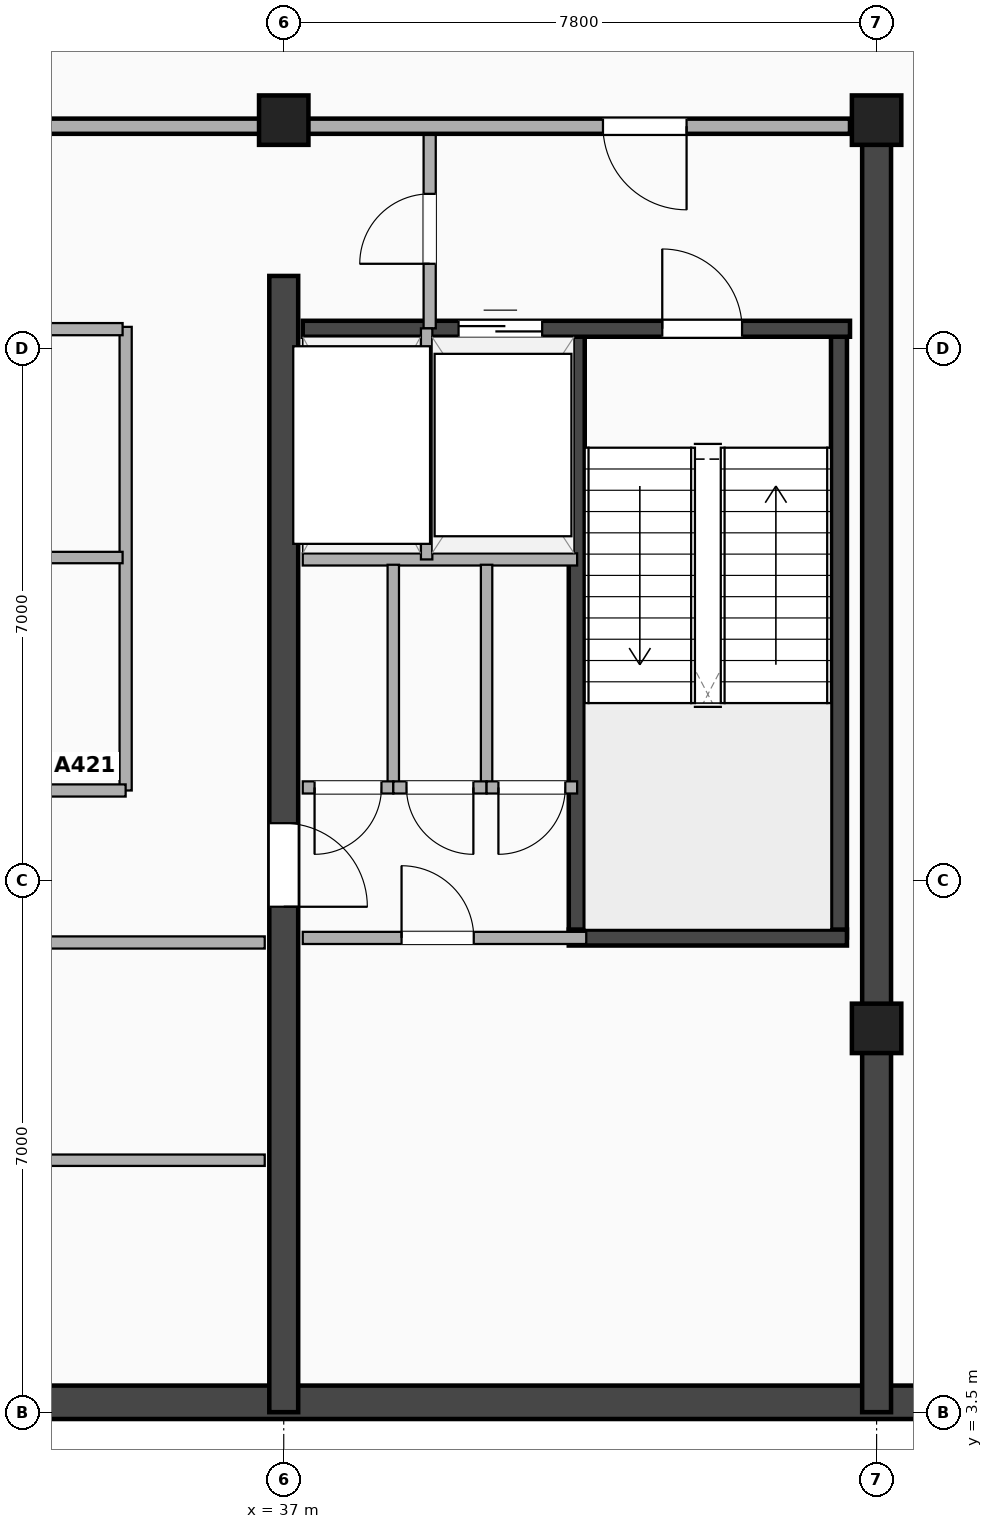
"""IFC4 building model, lengths in metres.
Left out: names, types, materials, properties, quantities, classifications, styles, units other than length and angle.
Written with IfcOpenShell. Run it as: python <this file> out.ifc"""

import sys

from ifc_helpers import new_model, si_unit, direction, frame, frame_2d, origin, origin_2d, place, context, subcontext, project, spatial, rectangle, extrude, element, fill, save


model = new_model("IFC4")
c1 = context("Model", 3, precision=1e-05, world=origin(), true_north=direction((0.0, 1.0)))
c2 = subcontext(c1, "Body", "Model", "MODEL_VIEW")
j1 = project(units=[si_unit("LENGTHUNIT", "METRE"), si_unit("PLANEANGLEUNIT", "RADIAN")], contexts=[c1])
p1 = place(None, origin())
s1 = spatial("IfcSite", under=j1, at=p1, CompositionType="ELEMENT")
p2 = place(p1, origin())
s2 = spatial("IfcBuilding", under=s1, at=p2, CompositionType="ELEMENT")
p3 = place(p2, frame((0.0, 0.0, 298.7)))
s3 = spatial("IfcBuildingStorey", under=s2, at=p3, CompositionType="ELEMENT", Elevation=298.7)
p4 = place(p3, frame((16.5, 3.63, 0.0), z_axis=(0.0, 0.0, 1.0), x_axis=(1.0, 0.0, 0.0)))
e1 = element("IfcWall", 1, at=p4, inside=s3, PredefinedType="SHEAR", context=c2, shape_type="SweptSolid", body=[
    extrude(rectangle(XDim=29.6, YDim=0.44, at=frame_2d((14.8, 0.0))), origin(), (0.0, 0.0, 1.0), 4.3),
])
p5 = place(p3, frame((44.8, 3.5, 0.0), z_axis=(0.0, 0.0, 1.0), x_axis=(0.0, 1.0, 0.0)))
e2 = element("IfcWall", 2, at=p5, inside=s3, PredefinedType="SHEAR", context=c2, shape_type="SweptSolid", body=[
    extrude(rectangle(XDim=16.9, YDim=0.38, at=frame_2d((8.45, 0.0))), origin(), (0.0, 0.0, 1.0), 4.3),
])
p6 = place(p3, frame((37.0, 3.5, 0.0), z_axis=(0.0, 0.0, 1.0), x_axis=(0.0, 1.0, 0.0)))
e3 = element("IfcWall", 3, at=p6, inside=s3, PredefinedType="SHEAR", context=c2, shape_type="SweptSolid", body=[
    extrude(rectangle(XDim=14.95, YDim=0.38, at=frame_2d((7.475, 0.0))), origin(), (0.0, 0.0, 1.0), 4.3),
])
p7 = place(p6, frame((6.65, 0.0, 0.0)))
e4 = element("IfcOpeningElement", 4, at=p7, cuts=e3, PredefinedType="OPENING", context=c2, shape_type="SweptSolid", body=[
    extrude(rectangle(XDim=1.1, YDim=2.15, at=frame_2d((0.55, 1.075))), frame((0.0, 0.2, 0.0), z_axis=(0.0, -1.0, 0.0), x_axis=(1.0, 0.0, 0.0)), (0.0, 0.0, 1.0), 0.4),
])
for number, where, z_axis, x_axis in (
    (5, (40.855, 9.745, 0.0), (0.0, 0.0, 1.0), (0.0, 1.0, 0.0)),
    (6, (44.305, 9.745, 0.0), (0.0, 0.0, 1.0), (0.0, 1.0, 0.0)),
):
    element("IfcWall", number, at=place(p3, frame(where, z_axis=z_axis, x_axis=x_axis)), inside=s3, PredefinedType="SHEAR", context=c2, shape_type="SweptSolid", body=[
        extrude(rectangle(XDim=8.01, YDim=0.21, at=frame_2d((4.005, 0.0))), origin(), (0.0, 0.0, 1.0), 4.3),
    ])
p8 = place(p3, frame((40.75, 9.745, 0.0), z_axis=(0.0, 0.0, 1.0), x_axis=(1.0, 0.0, 0.0)))
e7 = element("IfcWall", 7, at=p8, inside=s3, PredefinedType="SHEAR", context=c2, shape_type="SweptSolid", body=[
    extrude(rectangle(XDim=3.66, YDim=0.21, at=frame_2d((1.83, 0.0))), origin(), (0.0, 0.0, 1.0), 4.3),
])
p9 = place(p3, frame((37.25, 17.755, 0.0), z_axis=(0.0, 0.0, 1.0), x_axis=(1.0, 0.0, 0.0)))
e8 = element("IfcWall", 8, at=p9, inside=s3, PredefinedType="SHEAR", context=c2, shape_type="SweptSolid", body=[
    extrude(rectangle(XDim=7.2, YDim=0.21, at=frame_2d((3.6, 0.0))), origin(), (0.0, 0.0, 1.0), 4.3),
])
p10 = place(p9, frame((2.05, 0.0, 0.0)))
e9 = element("IfcOpeningElement", 9, at=p10, cuts=e8, PredefinedType="OPENING", context=c2, shape_type="SweptSolid", body=[
    extrude(rectangle(XDim=1.1, YDim=2.18, at=frame_2d((0.55, 1.09))), frame((0.0, 0.115, 0.0), z_axis=(0.0, -1.0, 0.0), x_axis=(1.0, 0.0, 0.0)), (0.0, 0.0, 1.0), 0.23),
])
p11 = place(p9, frame((5.78, 0.0, 0.0), z_axis=(0.0, 0.0, 1.0), x_axis=(-1.0, 0.0, 0.0)))
e10 = element("IfcOpeningElement", 10, at=p11, cuts=e8, PredefinedType="OPENING", context=c2, shape_type="SweptSolid", body=[
    extrude(rectangle(XDim=1.05, YDim=2.15, at=frame_2d((0.525, 1.075))), frame((0.0, 0.115, 0.0), z_axis=(0.0, -1.0, 0.0), x_axis=(1.0, 0.0, 0.0)), (0.0, 0.0, 1.0), 0.23),
])
for number, where, z_axis, x_axis in (
    (11, (44.8, 8.55, -0.3), (0.0, 0.0, 1.0), (1.0, 0.0, 0.0)),
    (12, (37.0, 20.5, -0.3), (0.0, 0.0, 1.0), (1.0, 0.0, 0.0)),
    (13, (44.8, 20.5, -0.3), (0.0, 0.0, 1.0), (1.0, 0.0, 0.0)),
):
    element("IfcColumn", number, at=place(p3, frame(where, z_axis=z_axis, x_axis=x_axis)), inside=s3, PredefinedType="COLUMN", context=c2, shape_type="SweptSolid", body=[
        extrude(rectangle(XDim=0.65, YDim=0.65, at=origin_2d()), origin(), (0.0, 0.0, 1.0), 4.6),
    ])
p12 = place(p3, frame((38.92, 17.76, 0.0), z_axis=(0.0, 0.0, 1.0), x_axis=(0.0, 1.0, 0.0)))
e14 = element("IfcWall", 14, at=p12, inside=s3, PredefinedType="PARTITIONING", context=c2, shape_type="SweptSolid", body=[
    extrude(rectangle(XDim=2.66, YDim=0.16, at=frame_2d((1.33, 0.0))), origin(), (0.0, 0.0, 1.0), 3.885),
])
p13 = place(p12, frame((1.77, 0.0, 0.0), z_axis=(0.0, 0.0, 1.0), x_axis=(-1.0, 0.0, 0.0)))
e15 = element("IfcOpeningElement", 15, at=p13, cuts=e14, PredefinedType="OPENING", context=c2, shape_type="SweptSolid", body=[
    extrude(rectangle(XDim=0.92, YDim=2.08, at=frame_2d((0.46, 1.04))), frame((0.0, 0.09, 0.0), z_axis=(0.0, -1.0, 0.0), x_axis=(1.0, 0.0, 0.0)), (0.0, 0.0, 1.0), 0.18),
])
p14 = place(p3, frame((37.25, 14.72, 0.0), z_axis=(0.0, 0.0, 1.0), x_axis=(1.0, 0.0, 0.0)))
e16 = element("IfcWall", 16, at=p14, inside=s3, PredefinedType="PARTITIONING", context=c2, shape_type="SweptSolid", body=[
    extrude(rectangle(XDim=3.61, YDim=0.16, at=frame_2d((1.805, 0.0))), origin(), (0.0, 0.0, 1.0), 4.3),
])
p15 = place(p3, frame((38.88, 14.72, 0.0), z_axis=(0.0, 0.0, 1.0), x_axis=(0.0, 1.0, 0.0)))
e17 = element("IfcWall", 17, at=p15, inside=s3, PredefinedType="PARTITIONING", context=c2, shape_type="SweptSolid", body=[
    extrude(rectangle(XDim=3.04, YDim=0.15, at=frame_2d((1.52, 0.0))), origin(), (0.0, 0.0, 1.0), 4.3),
])
p16 = place(p3, frame((29.2, 20.42, 0.0), z_axis=(0.0, 0.0, 1.0), x_axis=(1.0, 0.0, 0.0)))
e18 = element("IfcWall", 18, at=p16, inside=s3, PredefinedType="PARTITIONING", context=c2, shape_type="SweptSolid", body=[
    extrude(rectangle(XDim=7.8, YDim=0.2, at=frame_2d((3.9, 0.0))), origin(), (0.0, 0.0, 1.0), 2.605),
])
p17 = place(p16, frame((3.409, 0.0, 0.0)))
e19 = element("IfcOpeningElement", 19, at=p17, cuts=e18, PredefinedType="OPENING", context=c2, shape_type="SweptSolid", body=[
    extrude(rectangle(XDim=1.1, YDim=2.15, at=frame_2d((0.55, 1.075))), frame((0.0, 0.11, 0.0), z_axis=(0.0, -1.0, 0.0), x_axis=(1.0, 0.0, 0.0)), (0.0, 0.0, 1.0), 0.22),
])
p18 = place(p3, frame((37.0, 20.42, 0.0), z_axis=(0.0, 0.0, 1.0), x_axis=(1.0, 0.0, 0.0)))
e20 = element("IfcWall", 20, at=p18, inside=s3, PredefinedType="PARTITIONING", context=c2, shape_type="SweptSolid", body=[
    extrude(rectangle(XDim=7.45, YDim=0.2, at=frame_2d((3.725, 0.0))), origin(), (0.0, 0.0, 1.0), 2.605),
])
p19 = place(p18, frame((4.2, 0.0, 0.0)))
e21 = element("IfcOpeningElement", 21, at=p19, cuts=e20, PredefinedType="OPENING", context=c2, shape_type="SweptSolid", body=[
    extrude(rectangle(XDim=1.1, YDim=2.15, at=frame_2d((0.55, 1.075))), frame((0.0, 0.11, 0.0), z_axis=(0.0, -1.0, 0.0), x_axis=(1.0, 0.0, 0.0)), (0.0, 0.0, 1.0), 0.22),
])
p20 = place(p3, frame((38.441, 11.72, 0.0), z_axis=(0.0, 0.0, 1.0), x_axis=(0.0, 1.0, 0.0)))
e22 = element("IfcWall", 22, at=p20, inside=s3, PredefinedType="PARTITIONING", context=c2, shape_type="SweptSolid", body=[
    extrude(rectangle(XDim=2.93, YDim=0.15, at=frame_2d((1.465, 0.0))), origin(), (0.0, 0.0, 1.0), 4.3),
])
p21 = place(p3, frame((37.25, 11.72, 0.0), z_axis=(0.0, 0.0, 1.0), x_axis=(1.0, 0.0, 0.0)))
e23 = element("IfcWall", 23, at=p21, inside=s3, PredefinedType="PARTITIONING", context=c2, shape_type="SweptSolid", body=[
    extrude(rectangle(XDim=1.191, YDim=0.16, at=frame_2d((0.596, 0.0))), origin(), (0.0, 0.0, 1.0), 4.3),
])
p22 = place(p21, frame((0.156, 0.0, 0.0)))
e24 = element("IfcOpeningElement", 24, at=p22, cuts=e23, PredefinedType="OPENING", context=c2, shape_type="SweptSolid", body=[
    extrude(rectangle(XDim=0.88, YDim=2.08, at=frame_2d((0.44, 1.04))), frame((0.0, 0.09, 0.0), z_axis=(0.0, -1.0, 0.0), x_axis=(1.0, 0.0, 0.0)), (0.0, 0.0, 1.0), 0.18),
])
p23 = place(p3, frame((39.669, 11.72, 0.0), z_axis=(0.0, 0.0, 1.0), x_axis=(0.0, 1.0, 0.0)))
e25 = element("IfcWall", 25, at=p23, inside=s3, PredefinedType="PARTITIONING", context=c2, shape_type="SweptSolid", body=[
    extrude(rectangle(XDim=2.93, YDim=0.15, at=frame_2d((1.465, 0.0))), origin(), (0.0, 0.0, 1.0), 4.3),
])
p24 = place(p3, frame((38.441, 11.72, 0.0), z_axis=(0.0, 0.0, 1.0), x_axis=(1.0, 0.0, 0.0)))
e26 = element("IfcWall", 26, at=p24, inside=s3, PredefinedType="PARTITIONING", context=c2, shape_type="SweptSolid", body=[
    extrude(rectangle(XDim=1.227, YDim=0.16, at=frame_2d((0.614, 0.0))), origin(), (0.0, 0.0, 1.0), 4.3),
])
p25 = place(p24, frame((0.174, 0.0, 0.0)))
e27 = element("IfcOpeningElement", 27, at=p25, cuts=e26, PredefinedType="OPENING", context=c2, shape_type="SweptSolid", body=[
    extrude(rectangle(XDim=0.88, YDim=2.08, at=frame_2d((0.44, 1.04))), frame((0.0, 0.09, 0.0), z_axis=(0.0, -1.0, 0.0), x_axis=(1.0, 0.0, 0.0)), (0.0, 0.0, 1.0), 0.18),
])
p26 = place(p3, frame((39.669, 11.72, 0.0), z_axis=(0.0, 0.0, 1.0), x_axis=(1.0, 0.0, 0.0)))
e28 = element("IfcWall", 28, at=p26, inside=s3, PredefinedType="PARTITIONING", context=c2, shape_type="SweptSolid", body=[
    extrude(rectangle(XDim=1.191, YDim=0.16, at=frame_2d((0.596, 0.0))), origin(), (0.0, 0.0, 1.0), 4.3),
])
p27 = place(p26, frame((0.156, 0.0, 0.0)))
e29 = element("IfcOpeningElement", 29, at=p27, cuts=e28, PredefinedType="OPENING", context=c2, shape_type="SweptSolid", body=[
    extrude(rectangle(XDim=0.88, YDim=2.08, at=frame_2d((0.44, 1.04))), frame((0.0, 0.09, 0.0), z_axis=(0.0, -1.0, 0.0), x_axis=(1.0, 0.0, 0.0)), (0.0, 0.0, 1.0), 0.18),
])
p28 = place(p3, frame((37.25, 9.74, 0.0), z_axis=(0.0, 0.0, 1.0), x_axis=(1.0, 0.0, 0.0)))
e30 = element("IfcWall", 30, at=p28, inside=s3, PredefinedType="PARTITIONING", context=c2, shape_type="SweptSolid", body=[
    extrude(rectangle(XDim=3.73, YDim=0.16, at=frame_2d((1.865, 0.0))), origin(), (0.0, 0.0, 1.0), 4.3),
])
p29 = place(p28, frame((2.25, 0.0, 0.0), z_axis=(0.0, 0.0, 1.0), x_axis=(-1.0, 0.0, 0.0)))
e31 = element("IfcOpeningElement", 31, at=p29, cuts=e30, PredefinedType="OPENING", context=c2, shape_type="SweptSolid", body=[
    extrude(rectangle(XDim=0.95, YDim=2.15, at=frame_2d((0.475, 1.075))), frame((0.0, 0.09, 0.0), z_axis=(0.0, -1.0, 0.0), x_axis=(1.0, 0.0, 0.0)), (0.0, 0.0, 1.0), 0.18),
])
p30 = place(p3, frame((34.92, 11.68, 0.0), z_axis=(0.0, 0.0, 1.0), x_axis=(0.0, 1.0, 0.0)))
e32 = element("IfcWall", 32, at=p30, inside=s3, PredefinedType="PARTITIONING", context=c2, shape_type="SweptSolid", body=[
    extrude(rectangle(XDim=6.1, YDim=0.16, at=frame_2d((3.05, 0.0))), origin(), (0.0, 0.0, 1.0), 4.3),
])
p31 = place(p3, frame((29.45, 9.68, 0.0), z_axis=(0.0, 0.0, 1.0), x_axis=(1.0, 0.0, 0.0)))
e33 = element("IfcWall", 33, at=p31, inside=s3, PredefinedType="PARTITIONING", context=c2, shape_type="SweptSolid", body=[
    extrude(rectangle(XDim=7.3, YDim=0.16, at=frame_2d((3.65, 0.0))), origin(), (0.0, 0.0, 1.0), 4.3),
])
p32 = place(p31, frame((4.11, 0.0, 0.0), z_axis=(0.0, 0.0, 1.0), x_axis=(-1.0, 0.0, 0.0)))
e34 = element("IfcOpeningElement", 34, at=p32, cuts=e33, PredefinedType="OPENING", context=c2, shape_type="SweptSolid", body=[
    extrude(rectangle(XDim=0.92, YDim=2.08, at=frame_2d((0.46, 1.04))), frame((0.0, 0.09, 0.0), z_axis=(0.0, -1.0, 0.0), x_axis=(1.0, 0.0, 0.0)), (0.0, 0.0, 1.0), 0.18),
])
p33 = place(p3, frame((29.45, 6.815, 0.0), z_axis=(0.0, 0.0, 1.0), x_axis=(1.0, 0.0, 0.0)))
e35 = element("IfcWall", 35, at=p33, inside=s3, PredefinedType="PARTITIONING", context=c2, shape_type="SweptSolid", body=[
    extrude(rectangle(XDim=7.3, YDim=0.15, at=frame_2d((3.65, 0.0))), origin(), (0.0, 0.0, 1.0), 4.3),
])
p34 = place(p33, frame((4.09, 0.0, 0.0), z_axis=(0.0, 0.0, 1.0), x_axis=(-1.0, 0.0, 0.0)))
e36 = element("IfcOpeningElement", 36, at=p34, cuts=e35, PredefinedType="OPENING", context=c2, shape_type="SweptSolid", body=[
    extrude(rectangle(XDim=0.88, YDim=2.08, at=frame_2d((0.44, 1.04))), frame((0.0, 0.085, 0.0), z_axis=(0.0, -1.0, 0.0), x_axis=(1.0, 0.0, 0.0)), (0.0, 0.0, 1.0), 0.17),
])
p35 = place(p3, frame((29.2, 11.68, 0.0), z_axis=(0.0, 0.0, 1.0), x_axis=(1.0, 0.0, 0.0)))
e37 = element("IfcWall", 37, at=p35, inside=s3, PredefinedType="PARTITIONING", context=c2, shape_type="SweptSolid", body=[
    extrude(rectangle(XDim=5.72, YDim=0.16, at=frame_2d((2.86, 0.0))), origin(), (0.0, 0.0, 1.0), 4.3),
])
p36 = place(p3, frame((29.45, 17.75, 0.0), z_axis=(0.0, 0.0, 1.0), x_axis=(1.0, 0.0, 0.0)))
e38 = element("IfcWall", 38, at=p36, inside=s3, PredefinedType="PARTITIONING", context=c2, shape_type="SweptSolid", body=[
    extrude(rectangle(XDim=5.43, YDim=0.16, at=frame_2d((2.715, 0.0))), origin(), (0.0, 0.0, 1.0), 4.3),
])
p37 = place(p36, frame((3.175, 0.0, 0.0), z_axis=(0.0, 0.0, 1.0), x_axis=(-1.0, 0.0, 0.0)))
e39 = element("IfcOpeningElement", 39, at=p37, cuts=e38, PredefinedType="OPENING", context=c2, shape_type="SweptSolid", body=[
    extrude(rectangle(XDim=0.92, YDim=2.08, at=frame_2d((0.46, 1.04))), frame((0.0, 0.09, 0.0), z_axis=(0.0, -1.0, 0.0), x_axis=(1.0, 0.0, 0.0)), (0.0, 0.0, 1.0), 0.18),
])
p38 = place(p3, frame((29.45, 14.745, 0.0), z_axis=(0.0, 0.0, 1.0), x_axis=(1.0, 0.0, 0.0)))
e40 = element("IfcWall", 40, at=p38, inside=s3, PredefinedType="PARTITIONING", context=c2, shape_type="SweptSolid", body=[
    extrude(rectangle(XDim=5.43, YDim=0.15, at=frame_2d((2.715, 0.0))), origin(), (0.0, 0.0, 1.0), 4.3),
])
p39 = place(p38, frame((3.155, 0.0, 0.0), z_axis=(0.0, 0.0, 1.0), x_axis=(-1.0, 0.0, 0.0)))
e41 = element("IfcOpeningElement", 41, at=p39, cuts=e40, PredefinedType="OPENING", context=c2, shape_type="SweptSolid", body=[
    extrude(rectangle(XDim=0.88, YDim=2.08, at=frame_2d((0.44, 1.04))), frame((0.0, 0.085, 0.0), z_axis=(0.0, -1.0, 0.0), x_axis=(1.0, 0.0, 0.0)), (0.0, 0.0, 1.0), 0.17),
])
p40 = place(p10, origin())
e42 = element("IfcDoor", 42, at=p40, inside=s3, OperationType="DOUBLE_DOOR_SLIDING", PredefinedType="DOOR", context=c2, shape_type="SweptSolid", body=[
    extrude(rectangle(XDim=1.1, YDim=2.18, at=frame_2d((0.55, 1.09))), frame((0.0, 0.025, 0.0), z_axis=(0.0, -1.0, 0.0), x_axis=(1.0, 0.0, 0.0)), (0.0, 0.0, 1.0), 0.05),
])
fill(e9, e42)
p41 = place(p11, origin())
e43 = element("IfcDoor", 43, at=p41, inside=s3, OperationType="SINGLE_SWING_LEFT", PredefinedType="DOOR", context=c2, shape_type="SweptSolid", body=[
    extrude(rectangle(XDim=1.05, YDim=2.15, at=frame_2d((0.525, 1.075))), frame((0.0, 0.025, 0.0), z_axis=(0.0, -1.0, 0.0), x_axis=(1.0, 0.0, 0.0)), (0.0, 0.0, 1.0), 0.05),
])
fill(e10, e43)
p42 = place(p7, origin())
e44 = element("IfcDoor", 44, at=p42, inside=s3, OperationType="SINGLE_SWING_LEFT", PredefinedType="DOOR", context=c2, shape_type="SweptSolid", body=[
    extrude(rectangle(XDim=1.1, YDim=2.15, at=frame_2d((0.55, 1.075))), frame((0.0, 0.025, 0.0), z_axis=(0.0, -1.0, 0.0), x_axis=(1.0, 0.0, 0.0)), (0.0, 0.0, 1.0), 0.05),
])
fill(e4, e44)
p43 = place(p13, origin())
e45 = element("IfcDoor", 45, at=p43, inside=s3, OperationType="SINGLE_SWING_LEFT", PredefinedType="DOOR", context=c2, shape_type="SweptSolid", body=[
    extrude(rectangle(XDim=0.92, YDim=2.08, at=frame_2d((0.46, 1.04))), frame((0.0, 0.025, 0.0), z_axis=(0.0, -1.0, 0.0), x_axis=(1.0, 0.0, 0.0)), (0.0, 0.0, 1.0), 0.05),
])
fill(e15, e45)
p44 = place(p19, origin())
e46 = element("IfcDoor", 46, at=p44, inside=s3, OperationType="SINGLE_SWING_RIGHT", PredefinedType="DOOR", context=c2, shape_type="SweptSolid", body=[
    extrude(rectangle(XDim=1.1, YDim=2.15, at=frame_2d((0.55, 1.075))), frame((0.0, 0.025, 0.0), z_axis=(0.0, -1.0, 0.0), x_axis=(1.0, 0.0, 0.0)), (0.0, 0.0, 1.0), 0.05),
])
fill(e21, e46)
p45 = place(p22, origin())
e47 = element("IfcDoor", 47, at=p45, inside=s3, OperationType="SINGLE_SWING_LEFT", PredefinedType="DOOR", context=c2, shape_type="SweptSolid", body=[
    extrude(rectangle(XDim=0.88, YDim=2.08, at=frame_2d((0.44, 1.04))), frame((0.0, 0.025, 0.0), z_axis=(0.0, -1.0, 0.0), x_axis=(1.0, 0.0, 0.0)), (0.0, 0.0, 1.0), 0.05),
])
fill(e24, e47)
p46 = place(p25, origin())
e48 = element("IfcDoor", 48, at=p46, inside=s3, OperationType="SINGLE_SWING_RIGHT", PredefinedType="DOOR", context=c2, shape_type="SweptSolid", body=[
    extrude(rectangle(XDim=0.88, YDim=2.08, at=frame_2d((0.44, 1.04))), frame((0.0, 0.025, 0.0), z_axis=(0.0, -1.0, 0.0), x_axis=(1.0, 0.0, 0.0)), (0.0, 0.0, 1.0), 0.05),
])
fill(e27, e48)
p47 = place(p27, origin())
e49 = element("IfcDoor", 49, at=p47, inside=s3, OperationType="SINGLE_SWING_LEFT", PredefinedType="DOOR", context=c2, shape_type="SweptSolid", body=[
    extrude(rectangle(XDim=0.88, YDim=2.08, at=frame_2d((0.44, 1.04))), frame((0.0, 0.025, 0.0), z_axis=(0.0, -1.0, 0.0), x_axis=(1.0, 0.0, 0.0)), (0.0, 0.0, 1.0), 0.05),
])
fill(e29, e49)
p48 = place(p29, origin())
e50 = element("IfcDoor", 50, at=p48, inside=s3, OperationType="SINGLE_SWING_LEFT", PredefinedType="DOOR", context=c2, shape_type="SweptSolid", body=[
    extrude(rectangle(XDim=0.95, YDim=2.15, at=frame_2d((0.475, 1.075))), frame((0.0, 0.025, 0.0), z_axis=(0.0, -1.0, 0.0), x_axis=(1.0, 0.0, 0.0)), (0.0, 0.0, 1.0), 0.05),
])
fill(e31, e50)
save(model, sys.argv[1])
